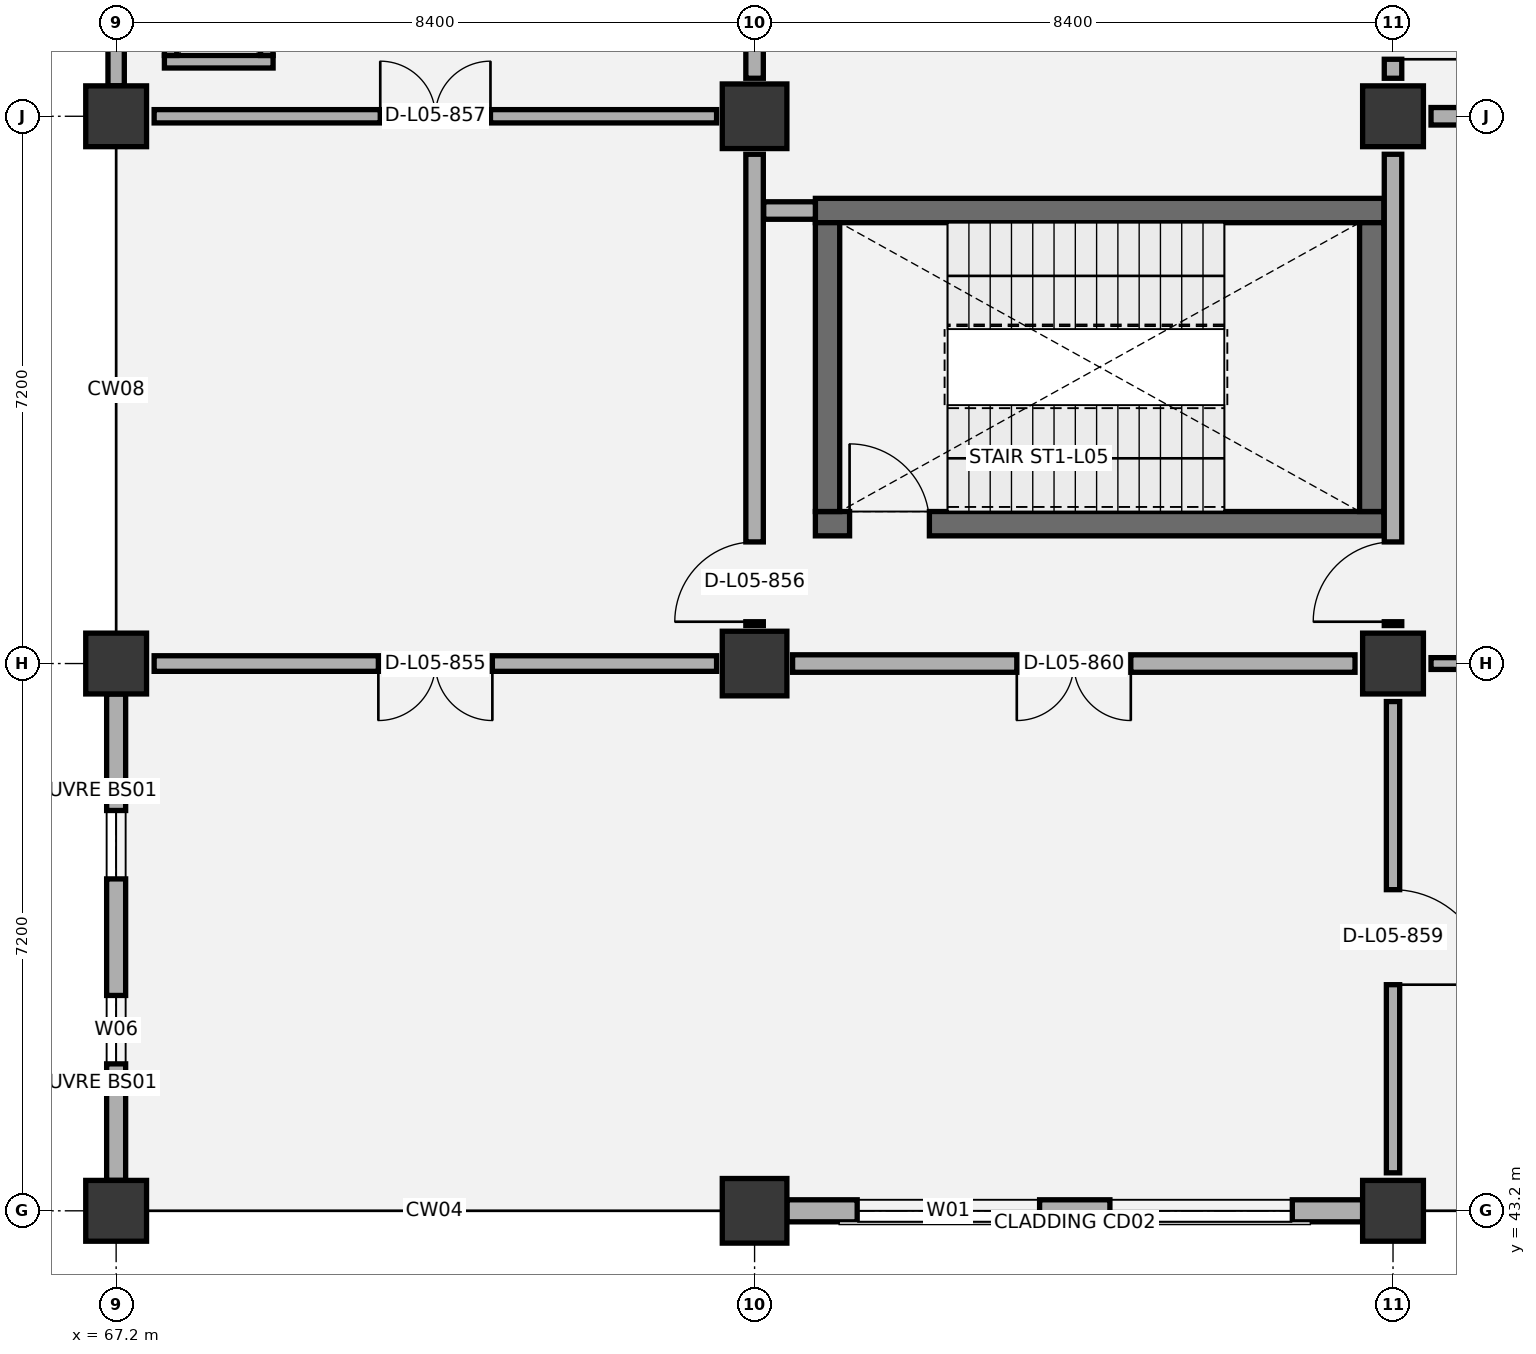
"""IFC4 building model, lengths in metres.
Left out: names, types, materials, properties, quantities, classifications, styles, units other than length and angle.
Written with IfcOpenShell. Run it as: python <this file> out.ifc"""

import sys

from ifc_helpers import new_model, si_unit, direction, frame, frame_2d, origin, origin_2d, place, context, subcontext, project, spatial, rectangle, extrude, element, fill, save


model = new_model("IFC4")
c1 = context("Model", 3, precision=1e-05, world=origin(), true_north=direction((0.0, 1.0)))
c2 = subcontext(c1, "Body", "Model", "MODEL_VIEW")
j1 = project(units=[si_unit("LENGTHUNIT", "METRE"), si_unit("PLANEANGLEUNIT", "RADIAN")], contexts=[c1])
p1 = place(None, origin())
s1 = spatial("IfcSite", under=j1, at=p1, CompositionType="ELEMENT")
p2 = place(p1, origin())
s2 = spatial("IfcBuilding", under=s1, at=p2, CompositionType="ELEMENT")
p3 = place(p2, frame((0.0, 0.0, 27.0)))
s3 = spatial("IfcBuildingStorey", under=s2, at=p3, CompositionType="ELEMENT", Elevation=27.0)
for number, where, z_axis, x_axis in (
    (1, (67.2, 43.2, 0.0), (0.0, 0.0, 1.0), (1.0, 0.0, 0.0)),
    (2, (67.2, 50.4, 0.0), (0.0, 0.0, 1.0), (1.0, 0.0, 0.0)),
    (3, (67.2, 57.6, 0.0), (0.0, 0.0, 1.0), (1.0, 0.0, 0.0)),
):
    element("IfcColumn", number, at=place(p3, frame(where, z_axis=z_axis, x_axis=x_axis)), inside=s3, PredefinedType="COLUMN", context=c2, shape_type="SweptSolid", body=[
        extrude(rectangle(XDim=0.8, YDim=0.8, at=origin_2d()), origin(), (0.0, 0.0, 1.0), 4.2),
    ])
for number, where, z_axis, x_axis in (
    (4, (75.6, 43.2, 0.0), (0.0, 0.0, 1.0), (1.0, 0.0, 0.0)),
    (5, (75.6, 50.4, 0.0), (0.0, 0.0, 1.0), (1.0, 0.0, 0.0)),
    (6, (75.6, 57.6, 0.0), (0.0, 0.0, 1.0), (1.0, 0.0, 0.0)),
):
    element("IfcColumn", number, at=place(p3, frame(where, z_axis=z_axis, x_axis=x_axis)), inside=s3, PredefinedType="COLUMN", context=c2, shape_type="SweptSolid", body=[
        extrude(rectangle(XDim=0.85, YDim=0.85, at=origin_2d()), origin(), (0.0, 0.0, 1.0), 4.2),
    ])
for number, where, z_axis, x_axis in (
    (7, (84.0, 43.2, 0.0), (0.0, 0.0, 1.0), (1.0, 0.0, 0.0)),
    (8, (84.0, 50.4, 0.0), (0.0, 0.0, 1.0), (1.0, 0.0, 0.0)),
    (9, (84.0, 57.6, 0.0), (0.0, 0.0, 1.0), (1.0, 0.0, 0.0)),
):
    element("IfcColumn", number, at=place(p3, frame(where, z_axis=z_axis, x_axis=x_axis)), inside=s3, PredefinedType="COLUMN", context=c2, shape_type="SweptSolid", body=[
        extrude(rectangle(XDim=0.8, YDim=0.8, at=origin_2d()), origin(), (0.0, 0.0, 1.0), 4.2),
    ])
p4 = place(p3, frame((76.4, 52.24, 0.0), z_axis=(0.0, 0.0, 1.0), x_axis=(1.0, 0.0, 0.0)))
e10 = element("IfcWall", 10, at=p4, inside=s3, PredefinedType="SHEAR", context=c2, shape_type="SweptSolid", body=[
    extrude(rectangle(XDim=7.48, YDim=0.32, at=frame_2d((3.74, 0.0))), origin(), (0.0, 0.0, 1.0), 3.92),
])
p5 = place(p4, frame((0.45, 0.0, 0.0)))
e11 = element("IfcOpeningElement", 11, at=p5, cuts=e10, PredefinedType="OPENING", context=c2, shape_type="SweptSolid", body=[
    extrude(rectangle(XDim=1.05, YDim=2.15, at=frame_2d((0.525, 1.075))), frame((0.0, 0.17, 0.0), z_axis=(0.0, -1.0, 0.0), x_axis=(1.0, 0.0, 0.0)), (0.0, 0.0, 1.0), 0.34),
])
p6 = place(p3, frame((76.4, 56.36, 0.0), z_axis=(0.0, 0.0, 1.0), x_axis=(1.0, 0.0, 0.0)))
e12 = element("IfcWall", 12, at=p6, inside=s3, PredefinedType="SHEAR", context=c2, shape_type="SweptSolid", body=[
    extrude(rectangle(XDim=7.48, YDim=0.32, at=frame_2d((3.74, 0.0))), origin(), (0.0, 0.0, 1.0), 3.92),
])
for number, where, z_axis, x_axis in (
    (13, (76.56, 52.4, 0.0), (0.0, 0.0, 1.0), (0.0, 1.0, 0.0)),
    (14, (83.72, 52.4, 0.0), (0.0, 0.0, 1.0), (0.0, 1.0, 0.0)),
):
    element("IfcWall", number, at=place(p3, frame(where, z_axis=z_axis, x_axis=x_axis)), inside=s3, PredefinedType="SHEAR", context=c2, shape_type="SweptSolid", body=[
        extrude(rectangle(XDim=3.8, YDim=0.32, at=frame_2d((1.9, 0.0))), origin(), (0.0, 0.0, 1.0), 3.92),
    ])
p7 = place(p3, frame((67.2, 43.6, 0.0), z_axis=(0.0, 0.0, 1.0), x_axis=(0.0, 1.0, 0.0)))
e15 = element("IfcWall", 15, at=p7, inside=s3, PredefinedType="SOLIDWALL", context=c2, shape_type="SweptSolid", body=[
    extrude(rectangle(XDim=6.4, YDim=0.25, at=frame_2d((3.2, 0.0))), origin(), (0.0, 0.0, 1.0), 3.365),
])
p8 = place(p7, frame((1.533, 0.0, 0.9)))
e16 = element("IfcOpeningElement", 16, at=p8, cuts=e15, PredefinedType="OPENING", context=c2, shape_type="SweptSolid", body=[
    extrude(rectangle(XDim=0.9, YDim=1.8, at=frame_2d((0.45, 0.9))), frame((0.0, 0.135, 0.0), z_axis=(0.0, -1.0, 0.0), x_axis=(1.0, 0.0, 0.0)), (0.0, 0.0, 1.0), 0.27),
])
p9 = place(p7, frame((3.967, 0.0, 0.9)))
e17 = element("IfcOpeningElement", 17, at=p9, cuts=e15, PredefinedType="OPENING", context=c2, shape_type="SweptSolid", body=[
    extrude(rectangle(XDim=0.9, YDim=1.8, at=frame_2d((0.45, 0.9))), frame((0.0, 0.135, 0.0), z_axis=(0.0, -1.0, 0.0), x_axis=(1.0, 0.0, 0.0)), (0.0, 0.0, 1.0), 0.27),
])
p10 = place(p3, frame((67.2, 58.0, 0.0), z_axis=(0.0, 0.0, 1.0), x_axis=(0.0, 1.0, 0.0)))
e18 = element("IfcWall", 18, at=p10, inside=s3, PredefinedType="SOLIDWALL", context=c2, shape_type="SweptSolid", body=[
    extrude(rectangle(XDim=6.4, YDim=0.215, at=frame_2d((3.2, 0.0))), origin(), (0.0, 0.0, 1.0), 3.365),
])
p11 = place(p10, frame((0.833, 0.0, 0.9)))
e19 = element("IfcOpeningElement", 19, at=p11, cuts=e18, PredefinedType="OPENING", context=c2, shape_type="SweptSolid", body=[
    extrude(rectangle(XDim=1.95, YDim=1.95, at=frame_2d((0.975, 0.975))), frame((0.0, 0.117, 0.0), z_axis=(0.0, -1.0, 0.0), x_axis=(1.0, 0.0, 0.0)), (0.0, 0.0, 1.0), 0.235),
])
p12 = place(p10, frame((3.617, 0.0, 0.9)))
e20 = element("IfcOpeningElement", 20, at=p12, cuts=e18, PredefinedType="OPENING", context=c2, shape_type="SweptSolid", body=[
    extrude(rectangle(XDim=1.95, YDim=1.95, at=frame_2d((0.975, 0.975))), frame((0.0, 0.117, 0.0), z_axis=(0.0, -1.0, 0.0), x_axis=(1.0, 0.0, 0.0)), (0.0, 0.0, 1.0), 0.235),
])
p13 = place(p3, frame((76.025, 43.2, 0.0), z_axis=(0.0, 0.0, 1.0), x_axis=(1.0, 0.0, 0.0)))
e21 = element("IfcWall", 21, at=p13, inside=s3, PredefinedType="SOLIDWALL", context=c2, shape_type="SweptSolid", body=[
    extrude(rectangle(XDim=7.575, YDim=0.29, at=frame_2d((3.788, 0.0))), origin(), (0.0, 0.0, 1.0), 3.365),
])
p14 = place(p13, frame((0.925, 0.0, 0.9)))
e22 = element("IfcOpeningElement", 22, at=p14, cuts=e21, PredefinedType="OPENING", context=c2, shape_type="SweptSolid", body=[
    extrude(rectangle(XDim=2.4, YDim=1.8, at=frame_2d((1.2, 0.9))), frame((0.0, 0.155, 0.0), z_axis=(0.0, -1.0, 0.0), x_axis=(1.0, 0.0, 0.0)), (0.0, 0.0, 1.0), 0.31),
])
p15 = place(p13, frame((4.25, 0.0, 0.9)))
e23 = element("IfcOpeningElement", 23, at=p15, cuts=e21, PredefinedType="OPENING", context=c2, shape_type="SweptSolid", body=[
    extrude(rectangle(XDim=2.4, YDim=1.8, at=frame_2d((1.2, 0.9))), frame((0.0, 0.155, 0.0), z_axis=(0.0, -1.0, 0.0), x_axis=(1.0, 0.0, 0.0)), (0.0, 0.0, 1.0), 0.31),
])
p16 = place(p3, frame((67.835, 58.317, 0.0), z_axis=(0.0, 0.0, 1.0), x_axis=(1.0, 0.0, 0.0)))
e24 = element("IfcWall", 24, at=p16, inside=s3, PredefinedType="PARTITIONING", context=c2, shape_type="SweptSolid", body=[
    extrude(rectangle(XDim=1.43, YDim=0.165, at=frame_2d((0.715, 0.0))), origin(), (0.0, 0.0, 1.0), 3.92),
])
for number, where, z_axis, x_axis in (
    (25, (67.917, 58.4, 0.0), (0.0, 0.0, 1.0), (0.0, 1.0, 0.0)),
    (26, (69.183, 58.4, 0.0), (0.0, 0.0, 1.0), (0.0, 1.0, 0.0)),
):
    element("IfcWall", number, at=place(p3, frame(where, z_axis=z_axis, x_axis=x_axis)), inside=s3, PredefinedType="PARTITIONING", context=c2, shape_type="SweptSolid", body=[
        extrude(rectangle(XDim=0.8, YDim=0.165, at=frame_2d((0.4, 0.0))), origin(), (0.0, 0.0, 1.0), 3.92),
    ])
p17 = place(p3, frame((67.7, 50.4, 0.0), z_axis=(0.0, 0.0, 1.0), x_axis=(1.0, 0.0, 0.0)))
e27 = element("IfcWall", 27, at=p17, inside=s3, PredefinedType="PARTITIONING", context=c2, shape_type="SweptSolid", body=[
    extrude(rectangle(XDim=7.4, YDim=0.205, at=frame_2d((3.7, 0.0))), origin(), (0.0, 0.0, 1.0), 3.215),
])
p18 = place(p17, frame((2.95, 0.0, 0.0)))
e28 = element("IfcOpeningElement", 28, at=p18, cuts=e27, PredefinedType="OPENING", context=c2, shape_type="SweptSolid", body=[
    extrude(rectangle(XDim=1.5, YDim=2.2, at=frame_2d((0.75, 1.1))), frame((0.0, 0.113, 0.0), z_axis=(0.0, -1.0, 0.0), x_axis=(1.0, 0.0, 0.0)), (0.0, 0.0, 1.0), 0.225),
])
p19 = place(p3, frame((75.6, 50.9, 0.0), z_axis=(0.0, 0.0, 1.0), x_axis=(0.0, 1.0, 0.0)))
e29 = element("IfcWall", 29, at=p19, inside=s3, PredefinedType="PARTITIONING", context=c2, shape_type="SweptSolid", body=[
    extrude(rectangle(XDim=6.2, YDim=0.23, at=frame_2d((3.1, 0.0))), origin(), (0.0, 0.0, 1.0), 3.265),
])
p20 = place(p19, frame((0.05, 0.0, 0.0)))
e30 = element("IfcOpeningElement", 30, at=p20, cuts=e29, PredefinedType="OPENING", context=c2, shape_type="SweptSolid", body=[
    extrude(rectangle(XDim=1.05, YDim=2.15, at=frame_2d((0.525, 1.075))), frame((0.0, 0.125, 0.0), z_axis=(0.0, -1.0, 0.0), x_axis=(1.0, 0.0, 0.0)), (0.0, 0.0, 1.0), 0.25),
])
p21 = place(p3, frame((67.7, 57.6, 0.0), z_axis=(0.0, 0.0, 1.0), x_axis=(1.0, 0.0, 0.0)))
e31 = element("IfcWall", 31, at=p21, inside=s3, PredefinedType="PARTITIONING", context=c2, shape_type="SweptSolid", body=[
    extrude(rectangle(XDim=7.4, YDim=0.175, at=frame_2d((3.7, 0.0))), origin(), (0.0, 0.0, 1.0), 3.215),
])
p22 = place(p21, frame((2.975, 0.0, 0.0)))
e32 = element("IfcOpeningElement", 32, at=p22, cuts=e31, PredefinedType="OPENING", context=c2, shape_type="SweptSolid", body=[
    extrude(rectangle(XDim=1.45, YDim=2.2, at=frame_2d((0.725, 1.1))), frame((0.0, 0.097, 0.0), z_axis=(0.0, -1.0, 0.0), x_axis=(1.0, 0.0, 0.0)), (0.0, 0.0, 1.0), 0.195),
])
p23 = place(p3, frame((75.6, 58.1, 0.0), z_axis=(0.0, 0.0, 1.0), x_axis=(0.0, 1.0, 0.0)))
e33 = element("IfcWall", 33, at=p23, inside=s3, PredefinedType="PARTITIONING", context=c2, shape_type="SweptSolid", body=[
    extrude(rectangle(XDim=6.2, YDim=0.23, at=frame_2d((3.1, 0.0))), origin(), (0.0, 0.0, 1.0), 3.415),
])
p24 = place(p3, frame((84.0, 43.7, 0.0), z_axis=(0.0, 0.0, 1.0), x_axis=(0.0, 1.0, 0.0)))
e34 = element("IfcWall", 34, at=p24, inside=s3, PredefinedType="PARTITIONING", context=c2, shape_type="SweptSolid", body=[
    extrude(rectangle(XDim=6.2, YDim=0.175, at=frame_2d((3.1, 0.0))), origin(), (0.0, 0.0, 1.0), 3.265),
])
p25 = place(p24, frame((2.475, 0.0, 0.0)))
e35 = element("IfcOpeningElement", 35, at=p25, cuts=e34, PredefinedType="OPENING", context=c2, shape_type="SweptSolid", body=[
    extrude(rectangle(XDim=1.25, YDim=2.1, at=frame_2d((0.625, 1.05))), frame((0.0, 0.097, 0.0), z_axis=(0.0, -1.0, 0.0), x_axis=(1.0, 0.0, 0.0)), (0.0, 0.0, 1.0), 0.195),
])
p26 = place(p3, frame((76.1, 50.4, 0.0), z_axis=(0.0, 0.0, 1.0), x_axis=(1.0, 0.0, 0.0)))
e36 = element("IfcWall", 36, at=p26, inside=s3, PredefinedType="PARTITIONING", context=c2, shape_type="SweptSolid", body=[
    extrude(rectangle(XDim=7.4, YDim=0.23, at=frame_2d((3.7, 0.0))), origin(), (0.0, 0.0, 1.0), 3.465),
])
p27 = place(p26, frame((2.95, 0.0, 0.0)))
e37 = element("IfcOpeningElement", 37, at=p27, cuts=e36, PredefinedType="OPENING", context=c2, shape_type="SweptSolid", body=[
    extrude(rectangle(XDim=1.5, YDim=2.15, at=frame_2d((0.75, 1.075))), frame((0.0, 0.125, 0.0), z_axis=(0.0, -1.0, 0.0), x_axis=(1.0, 0.0, 0.0)), (0.0, 0.0, 1.0), 0.25),
])
p28 = place(p3, frame((84.0, 50.9, 0.0), z_axis=(0.0, 0.0, 1.0), x_axis=(0.0, 1.0, 0.0)))
e38 = element("IfcWall", 38, at=p28, inside=s3, PredefinedType="PARTITIONING", context=c2, shape_type="SweptSolid", body=[
    extrude(rectangle(XDim=6.2, YDim=0.23, at=frame_2d((3.1, 0.0))), origin(), (0.0, 0.0, 1.0), 3.415),
])
p29 = place(p28, frame((0.05, 0.0, 0.0)))
e39 = element("IfcOpeningElement", 39, at=p29, cuts=e38, PredefinedType="OPENING", context=c2, shape_type="SweptSolid", body=[
    extrude(rectangle(XDim=1.05, YDim=2.15, at=frame_2d((0.525, 1.075))), frame((0.0, 0.125, 0.0), z_axis=(0.0, -1.0, 0.0), x_axis=(1.0, 0.0, 0.0)), (0.0, 0.0, 1.0), 0.25),
])
p30 = place(p3, frame((75.72, 56.36, 0.0), z_axis=(0.0, 0.0, 1.0), x_axis=(1.0, 0.0, 0.0)))
e40 = element("IfcWall", 40, at=p30, inside=s3, PredefinedType="PARTITIONING", context=c2, shape_type="SweptSolid", body=[
    extrude(rectangle(XDim=0.68, YDim=0.23, at=frame_2d((0.34, 0.0))), origin(), (0.0, 0.0, 1.0), 3.92),
])
p31 = place(p3, frame((84.0, 58.1, 0.0), z_axis=(0.0, 0.0, 1.0), x_axis=(0.0, 1.0, 0.0)))
e41 = element("IfcWall", 41, at=p31, inside=s3, PredefinedType="PARTITIONING", context=c2, shape_type="SweptSolid", body=[
    extrude(rectangle(XDim=6.2, YDim=0.23, at=frame_2d((3.1, 0.0))), origin(), (0.0, 0.0, 1.0), 3.265),
])
p32 = place(p31, frame((0.25, 0.0, 0.0)))
e42 = element("IfcOpeningElement", 42, at=p32, cuts=e41, PredefinedType="OPENING", context=c2, shape_type="SweptSolid", body=[
    extrude(rectangle(XDim=1.05, YDim=2.15, at=frame_2d((0.525, 1.075))), frame((0.0, 0.125, 0.0), z_axis=(0.0, -1.0, 0.0), x_axis=(1.0, 0.0, 0.0)), (0.0, 0.0, 1.0), 0.25),
])
p33 = place(p3, frame((84.5, 50.4, 0.0), z_axis=(0.0, 0.0, 1.0), x_axis=(1.0, 0.0, 0.0)))
e43 = element("IfcWall", 43, at=p33, inside=s3, PredefinedType="PARTITIONING", context=c2, shape_type="SweptSolid", body=[
    extrude(rectangle(XDim=7.4, YDim=0.155, at=frame_2d((3.7, 0.0))), origin(), (0.0, 0.0, 1.0), 3.515),
])
p34 = place(p33, frame((3.15, 0.0, 0.0)))
e44 = element("IfcOpeningElement", 44, at=p34, cuts=e43, PredefinedType="OPENING", context=c2, shape_type="SweptSolid", body=[
    extrude(rectangle(XDim=1.1, YDim=2.1, at=frame_2d((0.55, 1.05))), frame((0.0, 0.087, 0.0), z_axis=(0.0, -1.0, 0.0), x_axis=(1.0, 0.0, 0.0)), (0.0, 0.0, 1.0), 0.175),
])
p35 = place(p3, frame((84.5, 57.6, 0.0), z_axis=(0.0, 0.0, 1.0), x_axis=(1.0, 0.0, 0.0)))
e45 = element("IfcWall", 45, at=p35, inside=s3, PredefinedType="PARTITIONING", context=c2, shape_type="SweptSolid", body=[
    extrude(rectangle(XDim=7.4, YDim=0.23, at=frame_2d((3.7, 0.0))), origin(), (0.0, 0.0, 1.0), 3.515),
])
p36 = place(p35, frame((2.95, 0.0, 0.0)))
e46 = element("IfcOpeningElement", 46, at=p36, cuts=e45, PredefinedType="OPENING", context=c2, shape_type="SweptSolid", body=[
    extrude(rectangle(XDim=1.5, YDim=2.15, at=frame_2d((0.75, 1.075))), frame((0.0, 0.125, 0.0), z_axis=(0.0, -1.0, 0.0), x_axis=(1.0, 0.0, 0.0)), (0.0, 0.0, 1.0), 0.25),
])
p37 = place(p8, origin())
e47 = element("IfcWindow", 47, at=p37, inside=s3, PartitioningType="SINGLE_PANEL", PredefinedType="WINDOW", context=c2, shape_type="SweptSolid", body=[
    extrude(rectangle(XDim=0.9, YDim=1.8, at=frame_2d((0.45, 0.9))), frame((0.0, 0.03, 0.0), z_axis=(0.0, -1.0, 0.0), x_axis=(1.0, 0.0, 0.0)), (0.0, 0.0, 1.0), 0.06),
])
fill(e16, e47)
p38 = place(p9, origin())
e48 = element("IfcWindow", 48, at=p38, inside=s3, PartitioningType="SINGLE_PANEL", PredefinedType="WINDOW", context=c2, shape_type="SweptSolid", body=[
    extrude(rectangle(XDim=0.9, YDim=1.8, at=frame_2d((0.45, 0.9))), frame((0.0, 0.03, 0.0), z_axis=(0.0, -1.0, 0.0), x_axis=(1.0, 0.0, 0.0)), (0.0, 0.0, 1.0), 0.06),
])
fill(e17, e48)
p39 = place(p14, origin())
e49 = element("IfcWindow", 49, at=p39, inside=s3, PartitioningType="SINGLE_PANEL", PredefinedType="WINDOW", context=c2, shape_type="SweptSolid", body=[
    extrude(rectangle(XDim=2.4, YDim=1.8, at=frame_2d((1.2, 0.9))), frame((0.0, 0.03, 0.0), z_axis=(0.0, -1.0, 0.0), x_axis=(1.0, 0.0, 0.0)), (0.0, 0.0, 1.0), 0.06),
])
fill(e22, e49)
p40 = place(p15, origin())
e50 = element("IfcWindow", 50, at=p40, inside=s3, PartitioningType="SINGLE_PANEL", PredefinedType="WINDOW", context=c2, shape_type="SweptSolid", body=[
    extrude(rectangle(XDim=2.4, YDim=1.8, at=frame_2d((1.2, 0.9))), frame((0.0, 0.03, 0.0), z_axis=(0.0, -1.0, 0.0), x_axis=(1.0, 0.0, 0.0)), (0.0, 0.0, 1.0), 0.06),
])
fill(e23, e50)
p41 = place(p5, origin())
e51 = element("IfcDoor", 51, at=p41, inside=s3, OperationType="SINGLE_SWING_LEFT", PredefinedType="DOOR", context=c2, shape_type="SweptSolid", body=[
    extrude(rectangle(XDim=1.05, YDim=2.15, at=frame_2d((0.525, 1.075))), frame((0.0, 0.025, 0.0), z_axis=(0.0, -1.0, 0.0), x_axis=(1.0, 0.0, 0.0)), (0.0, 0.0, 1.0), 0.05),
])
fill(e11, e51)
p42 = place(p18, frame((1.5, 0.0, 0.0), z_axis=(0.0, 0.0, 1.0), x_axis=(-1.0, 0.0, 0.0)))
e52 = element("IfcDoor", 52, at=p42, inside=s3, OperationType="DOUBLE_DOOR_SINGLE_SWING", PredefinedType="DOOR", context=c2, shape_type="SweptSolid", body=[
    extrude(rectangle(XDim=1.5, YDim=2.2, at=frame_2d((0.75, 1.1))), frame((0.0, 0.025, 0.0), z_axis=(0.0, -1.0, 0.0), x_axis=(1.0, 0.0, 0.0)), (0.0, 0.0, 1.0), 0.05),
])
fill(e28, e52)
p43 = place(p20, origin())
e53 = element("IfcDoor", 53, at=p43, inside=s3, OperationType="SINGLE_SWING_LEFT", PredefinedType="DOOR", context=c2, shape_type="SweptSolid", body=[
    extrude(rectangle(XDim=1.05, YDim=2.15, at=frame_2d((0.525, 1.075))), frame((0.0, 0.025, 0.0), z_axis=(0.0, -1.0, 0.0), x_axis=(1.0, 0.0, 0.0)), (0.0, 0.0, 1.0), 0.05),
])
fill(e30, e53)
p44 = place(p22, origin())
e54 = element("IfcDoor", 54, at=p44, inside=s3, OperationType="DOUBLE_DOOR_SINGLE_SWING", PredefinedType="DOOR", context=c2, shape_type="SweptSolid", body=[
    extrude(rectangle(XDim=1.45, YDim=2.2, at=frame_2d((0.725, 1.1))), frame((0.0, 0.025, 0.0), z_axis=(0.0, -1.0, 0.0), x_axis=(1.0, 0.0, 0.0)), (0.0, 0.0, 1.0), 0.05),
])
fill(e32, e54)
p45 = place(p25, frame((1.25, 0.0, 0.0), z_axis=(0.0, 0.0, 1.0), x_axis=(-1.0, 0.0, 0.0)))
e55 = element("IfcDoor", 55, at=p45, inside=s3, OperationType="SINGLE_SWING_RIGHT", PredefinedType="DOOR", context=c2, shape_type="SweptSolid", body=[
    extrude(rectangle(XDim=1.25, YDim=2.1, at=frame_2d((0.625, 1.05))), frame((0.0, 0.025, 0.0), z_axis=(0.0, -1.0, 0.0), x_axis=(1.0, 0.0, 0.0)), (0.0, 0.0, 1.0), 0.05),
])
fill(e35, e55)
p46 = place(p27, frame((1.5, 0.0, 0.0), z_axis=(0.0, 0.0, 1.0), x_axis=(-1.0, 0.0, 0.0)))
e56 = element("IfcDoor", 56, at=p46, inside=s3, OperationType="DOUBLE_DOOR_SINGLE_SWING", PredefinedType="DOOR", context=c2, shape_type="SweptSolid", body=[
    extrude(rectangle(XDim=1.5, YDim=2.15, at=frame_2d((0.75, 1.075))), frame((0.0, 0.025, 0.0), z_axis=(0.0, -1.0, 0.0), x_axis=(1.0, 0.0, 0.0)), (0.0, 0.0, 1.0), 0.05),
])
fill(e37, e56)
p47 = place(p29, origin())
e57 = element("IfcDoor", 57, at=p47, inside=s3, OperationType="SINGLE_SWING_LEFT", PredefinedType="DOOR", context=c2, shape_type="SweptSolid", body=[
    extrude(rectangle(XDim=1.05, YDim=2.15, at=frame_2d((0.525, 1.075))), frame((0.0, 0.025, 0.0), z_axis=(0.0, -1.0, 0.0), x_axis=(1.0, 0.0, 0.0)), (0.0, 0.0, 1.0), 0.05),
])
fill(e39, e57)
p48 = place(p32, frame((1.05, 0.0, 0.0), z_axis=(0.0, 0.0, 1.0), x_axis=(-1.0, 0.0, 0.0)))
e58 = element("IfcDoor", 58, at=p48, inside=s3, OperationType="SINGLE_SWING_RIGHT", PredefinedType="DOOR", context=c2, shape_type="SweptSolid", body=[
    extrude(rectangle(XDim=1.05, YDim=2.15, at=frame_2d((0.525, 1.075))), frame((0.0, 0.025, 0.0), z_axis=(0.0, -1.0, 0.0), x_axis=(1.0, 0.0, 0.0)), (0.0, 0.0, 1.0), 0.05),
])
fill(e42, e58)
save(model, sys.argv[1])
